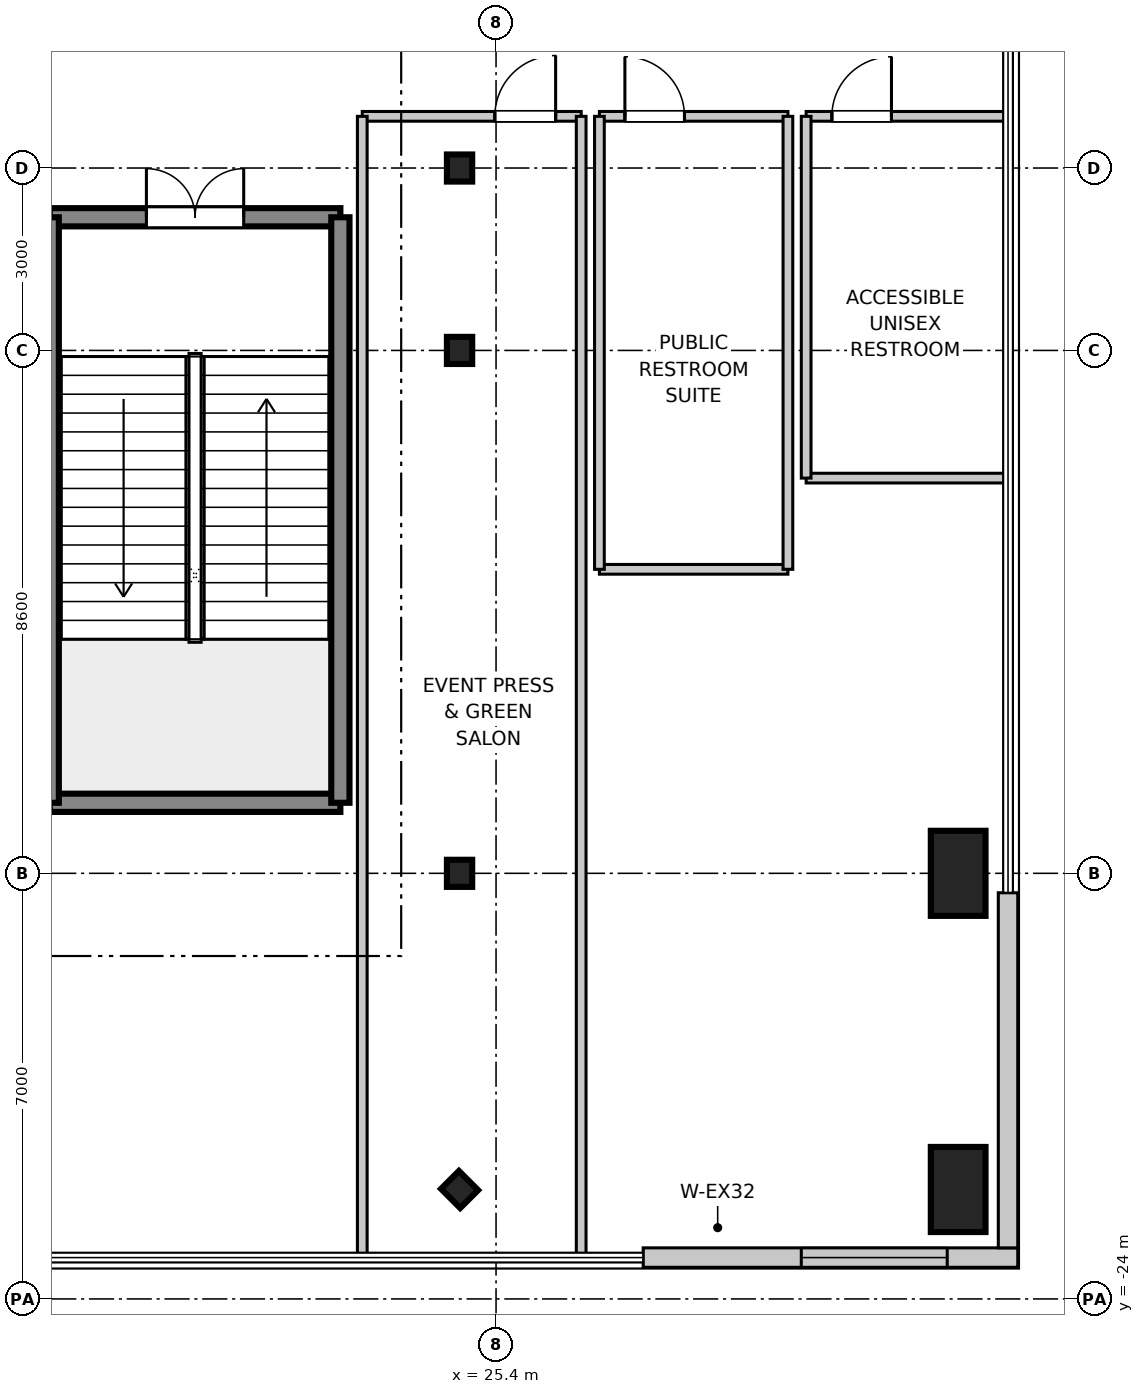
"""IFC4 building model, lengths in metres.
Left out: names, types, materials, properties, quantities, classifications, styles, units other than length and angle.
Written with IfcOpenShell. Run it as: python <this file> out.ifc"""

import sys

from ifc_helpers import new_model, si_unit, direction, frame, frame_2d, origin, origin_2d, place, context, subcontext, project, spatial, rectangle, i_section, extrude, source, transform, mapped, element, fill, save


model = new_model("IFC4")
c1 = context("Model", 3, precision=1e-05, world=origin(), true_north=direction((0.0, 1.0)))
c2 = subcontext(c1, "Body", "Model", "MODEL_VIEW")
j1 = project(units=[si_unit("LENGTHUNIT", "METRE"), si_unit("PLANEANGLEUNIT", "RADIAN")], contexts=[c1])
p1 = place(None, origin())
s1 = spatial("IfcSite", under=j1, at=p1, CompositionType="ELEMENT")
p2 = place(p1, origin())
s2 = spatial("IfcBuilding", under=s1, at=p2, CompositionType="ELEMENT")
p3 = place(p2, frame((0.0, 0.0, 21.6)))
s3 = spatial("IfcBuildingStorey", under=s2, at=p3, CompositionType="ELEMENT", Elevation=21.6)
m1 = source(origin(), c2, "Body", "SweptSolid", [
    extrude(rectangle(XDim=0.9, YDim=1.4, at=origin_2d()), origin(), (0.0, 0.0, 1.0), 5.355),
])
for number, where, z_axis, x_axis in (
    (1, (33.0, -22.2, 0.0), (0.0, 0.0, 1.0), (1.0, 0.0, 0.0)),
    (2, (33.0, -17.0, 0.0), (0.0, 0.0, 1.0), (1.0, 0.0, 0.0)),
):
    element("IfcColumn", number, at=place(p3, frame(where, z_axis=z_axis, x_axis=x_axis)), inside=s3, PredefinedType="PILASTER", context=c2, shape_type="MappedRepresentation", body=[
        mapped(m1, transform((0.0, 0.0, 0.0), scale=1.0)),
    ])
m2 = source(origin(), c2, "Body", "SweptSolid", [
    extrude(i_section(OverallWidth=0.416, OverallDepth=0.446, WebThickness=0.025, FlangeThickness=0.04, at=origin_2d()), origin(), (0.0, 0.0, 1.0), 5.255),
])
for number, where, z_axis, x_axis in (
    (3, (24.8, -17.0, 0.0), (0.0, 0.0, 1.0), (1.0, 0.0, 0.0)),
    (4, (24.8, -8.4, 0.0), (0.0, 0.0, 1.0), (1.0, 0.0, 0.0)),
    (5, (24.8, -5.4, 0.0), (0.0, 0.0, 1.0), (1.0, 0.0, 0.0)),
    (6, (24.8, -22.2, 0.0), (0.0, 0.0, 1.0), (0.707, 0.707, 0.0)),
):
    element("IfcColumn", number, at=place(p3, frame(where, z_axis=z_axis, x_axis=x_axis)), inside=s3, PredefinedType="COLUMN", context=c2, shape_type="MappedRepresentation", body=[
        mapped(m2, transform((0.0, 0.0, 0.0), scale=1.0)),
    ])
m3 = source(origin(), c2, "Body", "SweptSolid", [
    extrude(rectangle(XDim=4.78, YDim=0.3, at=frame_2d((2.39, 0.0))), origin(), (0.0, 0.0, 1.0), 4.98),
])
p4 = place(p3, frame((18.06, -15.84, 0.0), z_axis=(0.0, 0.0, 1.0), x_axis=(1.0, 0.0, 0.0)))
e7 = element("IfcWall", 7, at=p4, inside=s3, PredefinedType="SHEAR", context=c2, shape_type="MappedRepresentation", body=[
    mapped(m3, transform((0.0, 0.0, 0.0), scale=1.0)),
])
p5 = place(p3, frame((18.06, -6.21, 0.0), z_axis=(0.0, 0.0, 1.0), x_axis=(1.0, 0.0, 0.0)))
e8 = element("IfcWall", 8, at=p5, inside=s3, PredefinedType="SHEAR", context=c2, shape_type="MappedRepresentation", body=[
    mapped(m3, transform((0.0, 0.0, 0.0), scale=1.0)),
])
p6 = place(p5, frame((1.59, 0.0, 0.0)))
e9 = element("IfcOpeningElement", 9, at=p6, cuts=e8, PredefinedType="OPENING", context=c2, shape_type="SweptSolid", body=[
    extrude(rectangle(XDim=1.6, YDim=2.2, at=frame_2d((0.8, 1.1))), frame((0.0, 0.16, 0.0), z_axis=(0.0, -1.0, 0.0), x_axis=(1.0, 0.0, 0.0)), (0.0, 0.0, 1.0), 0.32),
])
m4 = source(origin(), c2, "Body", "SweptSolid", [
    extrude(rectangle(XDim=9.63, YDim=0.3, at=frame_2d((4.815, 0.0))), origin(), (0.0, 0.0, 1.0), 4.98),
])
for number, where, z_axis, x_axis in (
    (10, (18.06, -15.84, 0.0), (0.0, 0.0, 1.0), (0.0, 1.0, 0.0)),
    (11, (22.84, -15.84, 0.0), (0.0, 0.0, 1.0), (0.0, 1.0, 0.0)),
):
    element("IfcWall", number, at=place(p3, frame(where, z_axis=z_axis, x_axis=x_axis)), inside=s3, PredefinedType="SHEAR", context=c2, shape_type="MappedRepresentation", body=[
        mapped(m4, transform((0.0, 0.0, 0.0), scale=1.0)),
    ])
m5 = source(origin(), c2, "Body", "SweptSolid", [
    extrude(rectangle(XDim=6.16, YDim=0.32, at=frame_2d((3.08, 0.0))), origin(), (0.0, 0.0, 1.0), 4.98),
])
p7 = place(p3, frame((27.82, -23.32, 0.0), z_axis=(0.0, 0.0, 1.0), x_axis=(1.0, 0.0, 0.0)))
e12 = element("IfcWall", 12, at=p7, inside=s3, PredefinedType="STANDARD", context=c2, shape_type="MappedRepresentation", body=[
    mapped(m5, transform((0.0, 0.0, 0.0), scale=1.0)),
])
p8 = place(p7, frame((2.6, 0.0, 0.9)))
e13 = element("IfcOpeningElement", 13, at=p8, cuts=e12, PredefinedType="OPENING", context=c2, shape_type="SweptSolid", body=[
    extrude(rectangle(XDim=2.4, YDim=2.2, at=frame_2d((1.2, 1.1))), frame((0.0, 0.17, 0.0), z_axis=(0.0, -1.0, 0.0), x_axis=(1.0, 0.0, 0.0)), (0.0, 0.0, 1.0), 0.34),
])
m6 = source(origin(), c2, "Body", "SweptSolid", [
    extrude(rectangle(XDim=5.84, YDim=0.32, at=frame_2d((2.92, 0.0))), origin(), (0.0, 0.0, 1.0), 4.98),
])
p9 = place(p3, frame((33.82, -23.16, 0.0), z_axis=(0.0, 0.0, 1.0), x_axis=(0.0, 1.0, 0.0)))
e14 = element("IfcWall", 14, at=p9, inside=s3, PredefinedType="STANDARD", context=c2, shape_type="MappedRepresentation", body=[
    mapped(m6, transform((0.0, 0.0, 0.0), scale=1.0)),
])
m7 = source(origin(), c2, "Body", "SweptSolid", [
    extrude(rectangle(XDim=3.6, YDim=0.16, at=frame_2d((1.8, 0.0))), origin(), (0.0, 0.0, 1.0), 3.1),
])
p10 = place(p3, frame((23.2, -4.55, 0.0), z_axis=(0.0, 0.0, 1.0), x_axis=(1.0, 0.0, 0.0)))
e15 = element("IfcWall", 15, at=p10, inside=s3, PredefinedType="PARTITIONING", context=c2, shape_type="MappedRepresentation", body=[
    mapped(m7, transform((0.0, 0.0, 0.0), scale=1.0)),
])
p11 = place(p10, frame((2.18, 0.0, 0.0)))
e16 = element("IfcOpeningElement", 16, at=p11, cuts=e15, PredefinedType="OPENING", context=c2, shape_type="SweptSolid", body=[
    extrude(rectangle(XDim=1.0, YDim=2.1, at=frame_2d((0.5, 1.05))), frame((0.0, 0.09, 0.0), z_axis=(0.0, -1.0, 0.0), x_axis=(1.0, 0.0, 0.0)), (0.0, 0.0, 1.0), 0.18),
])
m8 = source(origin(), c2, "Body", "SweptSolid", [
    extrude(rectangle(XDim=18.71, YDim=0.16, at=frame_2d((9.355, 0.0))), origin(), (0.0, 0.0, 1.0), 3.1),
])
for number, where, z_axis, x_axis in (
    (17, (23.2, -23.26, 0.0), (0.0, 0.0, 1.0), (0.0, 1.0, 0.0)),
    (18, (26.8, -23.26, 0.0), (0.0, 0.0, 1.0), (0.0, 1.0, 0.0)),
):
    element("IfcWall", number, at=place(p3, frame(where, z_axis=z_axis, x_axis=x_axis)), inside=s3, PredefinedType="PARTITIONING", context=c2, shape_type="MappedRepresentation", body=[
        mapped(m8, transform((0.0, 0.0, 0.0), scale=1.0)),
    ])
m9 = source(origin(), c2, "Body", "SweptSolid", [
    extrude(rectangle(XDim=3.1, YDim=0.16, at=frame_2d((1.55, 0.0))), origin(), (0.0, 0.0, 1.0), 3.1),
])
p12 = place(p3, frame((27.1, -12.0, 0.0), z_axis=(0.0, 0.0, 1.0), x_axis=(1.0, 0.0, 0.0)))
e19 = element("IfcWall", 19, at=p12, inside=s3, PredefinedType="PARTITIONING", context=c2, shape_type="MappedRepresentation", body=[
    mapped(m9, transform((0.0, 0.0, 0.0), scale=1.0)),
])
p13 = place(p3, frame((27.1, -4.55, 0.0), z_axis=(0.0, 0.0, 1.0), x_axis=(1.0, 0.0, 0.0)))
e20 = element("IfcWall", 20, at=p13, inside=s3, PredefinedType="PARTITIONING", context=c2, shape_type="MappedRepresentation", body=[
    mapped(m9, transform((0.0, 0.0, 0.0), scale=1.0)),
])
p14 = place(p13, frame((0.419, 0.0, 0.0)))
e21 = element("IfcOpeningElement", 21, at=p14, cuts=e20, PredefinedType="OPENING", context=c2, shape_type="SweptSolid", body=[
    extrude(rectangle(XDim=0.98, YDim=2.1, at=frame_2d((0.49, 1.05))), frame((0.0, 0.09, 0.0), z_axis=(0.0, -1.0, 0.0), x_axis=(1.0, 0.0, 0.0)), (0.0, 0.0, 1.0), 0.18),
])
m10 = source(origin(), c2, "Body", "SweptSolid", [
    extrude(rectangle(XDim=7.45, YDim=0.16, at=frame_2d((3.725, 0.0))), origin(), (0.0, 0.0, 1.0), 3.1),
])
for number, where, z_axis, x_axis in (
    (22, (27.1, -12.0, 0.0), (0.0, 0.0, 1.0), (0.0, 1.0, 0.0)),
    (23, (30.2, -12.0, 0.0), (0.0, 0.0, 1.0), (0.0, 1.0, 0.0)),
):
    element("IfcWall", number, at=place(p3, frame(where, z_axis=z_axis, x_axis=x_axis)), inside=s3, PredefinedType="PARTITIONING", context=c2, shape_type="MappedRepresentation", body=[
        mapped(m10, transform((0.0, 0.0, 0.0), scale=1.0)),
    ])
m11 = source(origin(), c2, "Body", "SweptSolid", [
    extrude(rectangle(XDim=3.26, YDim=0.16, at=frame_2d((1.63, 0.0))), origin(), (0.0, 0.0, 1.0), 3.1),
])
p15 = place(p3, frame((30.5, -10.5, 0.0), z_axis=(0.0, 0.0, 1.0), x_axis=(1.0, 0.0, 0.0)))
e24 = element("IfcWall", 24, at=p15, inside=s3, PredefinedType="PARTITIONING", context=c2, shape_type="MappedRepresentation", body=[
    mapped(m11, transform((0.0, 0.0, 0.0), scale=1.0)),
])
p16 = place(p3, frame((30.5, -4.55, 0.0), z_axis=(0.0, 0.0, 1.0), x_axis=(1.0, 0.0, 0.0)))
e25 = element("IfcWall", 25, at=p16, inside=s3, PredefinedType="PARTITIONING", context=c2, shape_type="MappedRepresentation", body=[
    mapped(m11, transform((0.0, 0.0, 0.0), scale=1.0)),
])
p17 = place(p16, frame((0.423, 0.0, 0.0)))
e26 = element("IfcOpeningElement", 26, at=p17, cuts=e25, PredefinedType="OPENING", context=c2, shape_type="SweptSolid", body=[
    extrude(rectangle(XDim=0.98, YDim=2.1, at=frame_2d((0.49, 1.05))), frame((0.0, 0.09, 0.0), z_axis=(0.0, -1.0, 0.0), x_axis=(1.0, 0.0, 0.0)), (0.0, 0.0, 1.0), 0.18),
])
m12 = source(origin(), c2, "Body", "SweptSolid", [
    extrude(rectangle(XDim=5.95, YDim=0.16, at=frame_2d((2.975, 0.0))), origin(), (0.0, 0.0, 1.0), 3.1),
])
p18 = place(p3, frame((30.5, -10.5, 0.0), z_axis=(0.0, 0.0, 1.0), x_axis=(0.0, 1.0, 0.0)))
e27 = element("IfcWall", 27, at=p18, inside=s3, PredefinedType="PARTITIONING", context=c2, shape_type="MappedRepresentation", body=[
    mapped(m12, transform((0.0, 0.0, 0.0), scale=1.0)),
])
m13 = source(origin(), c2, "Body", "SweptSolid", [
    extrude(rectangle(XDim=1.6, YDim=2.2, at=frame_2d((0.8, 1.1))), frame((0.0, 0.025, 0.0), z_axis=(0.0, -1.0, 0.0), x_axis=(1.0, 0.0, 0.0)), (0.0, 0.0, 1.0), 0.05),
])
p19 = place(p6, frame((1.6, 0.0, 0.0), z_axis=(0.0, 0.0, 1.0), x_axis=(-1.0, 0.0, 0.0)))
e28 = element("IfcDoor", 28, at=p19, inside=s3, OperationType="DOUBLE_DOOR_SINGLE_SWING", PredefinedType="DOOR", context=c2, shape_type="MappedRepresentation", body=[
    mapped(m13, transform((0.0, 0.0, 0.0), scale=1.0)),
])
fill(e9, e28)
m14 = source(origin(), c2, "Body", "SweptSolid", [
    extrude(rectangle(XDim=2.4, YDim=2.2, at=frame_2d((1.2, 1.1))), frame((0.0, 0.03, 0.0), z_axis=(0.0, -1.0, 0.0), x_axis=(1.0, 0.0, 0.0)), (0.0, 0.0, 1.0), 0.06),
])
p20 = place(p8, origin())
e29 = element("IfcWindow", 29, at=p20, inside=s3, PartitioningType="SINGLE_PANEL", PredefinedType="WINDOW", context=c2, shape_type="MappedRepresentation", body=[
    mapped(m14, transform((0.0, 0.0, 0.0), scale=1.0)),
])
fill(e13, e29)
m15 = source(origin(), c2, "Body", "SweptSolid", [
    extrude(rectangle(XDim=1.0, YDim=2.1, at=frame_2d((0.5, 1.05))), frame((0.0, 0.025, 0.0), z_axis=(0.0, -1.0, 0.0), x_axis=(1.0, 0.0, 0.0)), (0.0, 0.0, 1.0), 0.05),
])
p21 = place(p11, frame((1.0, 0.0, 0.0), z_axis=(0.0, 0.0, 1.0), x_axis=(-1.0, 0.0, 0.0)))
e30 = element("IfcDoor", 30, at=p21, inside=s3, OperationType="SINGLE_SWING_RIGHT", PredefinedType="DOOR", context=c2, shape_type="MappedRepresentation", body=[
    mapped(m15, transform((0.0, 0.0, 0.0), scale=1.0)),
])
fill(e16, e30)
m16 = source(origin(), c2, "Body", "SweptSolid", [
    extrude(rectangle(XDim=0.98, YDim=2.1, at=frame_2d((0.49, 1.05))), frame((0.0, 0.025, 0.0), z_axis=(0.0, -1.0, 0.0), x_axis=(1.0, 0.0, 0.0)), (0.0, 0.0, 1.0), 0.05),
])
p22 = place(p14, frame((0.98, 0.0, 0.0), z_axis=(0.0, 0.0, 1.0), x_axis=(-1.0, 0.0, 0.0)))
e31 = element("IfcDoor", 31, at=p22, inside=s3, OperationType="SINGLE_SWING_LEFT", PredefinedType="DOOR", context=c2, shape_type="MappedRepresentation", body=[
    mapped(m16, transform((0.0, 0.0, 0.0), scale=1.0)),
])
fill(e21, e31)
p23 = place(p17, frame((0.98, 0.0, 0.0), z_axis=(0.0, 0.0, 1.0), x_axis=(-1.0, 0.0, 0.0)))
e32 = element("IfcDoor", 32, at=p23, inside=s3, OperationType="SINGLE_SWING_RIGHT", PredefinedType="DOOR", context=c2, shape_type="MappedRepresentation", body=[
    mapped(m16, transform((0.0, 0.0, 0.0), scale=1.0)),
])
fill(e26, e32)
save(model, sys.argv[1])
